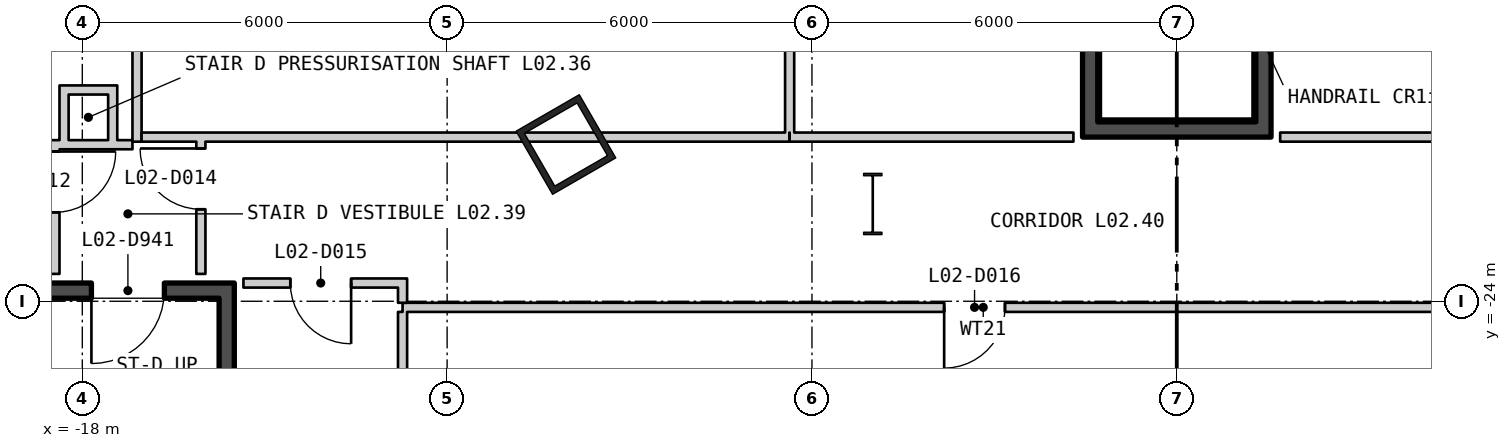
"""IFC4 building model, lengths in metres.
Left out: names, types, materials, properties, quantities, classifications, styles, units other than length and angle.
Written with IfcOpenShell. Run it as: python <this file> out.ifc"""

import sys

from ifc_helpers import new_model, si_unit, direction, frame, frame_2d, origin, origin_2d, place, context, subcontext, project, spatial, rectangle, hollow_rectangle, i_section, extrude, element, fill, save


model = new_model("IFC4")
c1 = context("Model", 3, precision=1e-05, world=origin(), true_north=direction((0.0, 1.0)))
c2 = subcontext(c1, "Body", "Model", "MODEL_VIEW")
j1 = project(units=[si_unit("LENGTHUNIT", "METRE"), si_unit("PLANEANGLEUNIT", "RADIAN")], contexts=[c1])
p1 = place(None, origin())
s1 = spatial("IfcSite", under=j1, at=p1, CompositionType="ELEMENT")
p2 = place(p1, origin())
s2 = spatial("IfcBuilding", under=s1, at=p2, CompositionType="ELEMENT")
p3 = place(p2, frame((0.0, 0.0, 13.5)))
s3 = spatial("IfcBuildingStorey", under=s2, at=p3, CompositionType="ELEMENT", Elevation=13.5)
p4 = place(p3, frame((-10.046, -21.422, 0.0), z_axis=(0.0, 0.0, 1.0), x_axis=(0.5, -0.866025403784, 0.0)))
e1 = element("IfcColumn", 1, at=p4, inside=s3, PredefinedType="COLUMN", context=c2, shape_type="SweptSolid", body=[
    extrude(hollow_rectangle(XDim=1.2, YDim=1.2, WallThickness=0.1, at=origin_2d()), origin(), (0.0, 0.0, 1.0), 5.1),
])
p5 = place(p3, frame((-5.0, -22.4, 0.0), z_axis=(0.0, 0.0, 1.0), x_axis=(1.0, 0.0, 0.0)))
e2 = element("IfcColumn", 2, at=p5, inside=s3, PredefinedType="COLUMN", context=c2, shape_type="SweptSolid", body=[
    extrude(i_section(OverallWidth=0.302, OverallDepth=1.008, WebThickness=0.021, FlangeThickness=0.04, at=origin_2d()), origin(), (0.0, 0.0, 1.0), 5.1),
])
p6 = place(p3, frame((-1.425, -21.05, 0.0), z_axis=(0.0, 0.0, 1.0), x_axis=(0.0, 1.0, 0.0)))
e3 = element("IfcWall", 3, at=p6, inside=s3, PredefinedType="SHEAR", context=c2, shape_type="SweptSolid", body=[
    extrude(rectangle(XDim=7.2, YDim=0.25, at=frame_2d((3.6, 0.0))), origin(), (0.0, 0.0, 1.0), 4.88),
])
p7 = place(p3, frame((1.425, -21.05, 0.0), z_axis=(0.0, 0.0, 1.0), x_axis=(0.0, 1.0, 0.0)))
e4 = element("IfcWall", 4, at=p7, inside=s3, PredefinedType="SHEAR", context=c2, shape_type="SweptSolid", body=[
    extrude(rectangle(XDim=7.2, YDim=0.25, at=frame_2d((3.6, 0.0))), origin(), (0.0, 0.0, 1.0), 4.88),
])
p8 = place(p7, frame((5.89, 0.0, 0.0)))
e5 = element("IfcOpeningElement", 5, at=p8, cuts=e4, PredefinedType="OPENING", context=c2, shape_type="SweptSolid", body=[
    extrude(rectangle(XDim=1.0, YDim=2.1, at=frame_2d((0.5, 1.05))), frame((0.0, 0.135, 0.0), z_axis=(0.0, -1.0, 0.0), x_axis=(1.0, 0.0, 0.0)), (0.0, 0.0, 1.0), 0.27),
])
p9 = place(p3, frame((-1.55, -21.175, 0.0), z_axis=(0.0, 0.0, 1.0), x_axis=(1.0, 0.0, 0.0)))
e6 = element("IfcWall", 6, at=p9, inside=s3, PredefinedType="SHEAR", context=c2, shape_type="SweptSolid", body=[
    extrude(rectangle(XDim=3.1, YDim=0.25, at=frame_2d((1.55, 0.0))), origin(), (0.0, 0.0, 1.0), 4.88),
])
p10 = place(p3, frame((-15.625, -31.25, 0.0), z_axis=(0.0, 0.0, 1.0), x_axis=(0.0, 1.0, 0.0)))
e7 = element("IfcWall", 7, at=p10, inside=s3, PredefinedType="SHEAR", context=c2, shape_type="SweptSolid", body=[
    extrude(rectangle(XDim=7.3, YDim=0.25, at=frame_2d((3.65, 0.0))), origin(), (0.0, 0.0, 1.0), 4.88),
])
p11 = place(p3, frame((-19.0, -23.825, 0.0), z_axis=(0.0, 0.0, 1.0), x_axis=(1.0, 0.0, 0.0)))
e8 = element("IfcWall", 8, at=p11, inside=s3, PredefinedType="SHEAR", context=c2, shape_type="SweptSolid", body=[
    extrude(rectangle(XDim=3.5, YDim=0.25, at=frame_2d((1.75, 0.0))), origin(), (0.0, 0.0, 1.0), 4.88),
])
p12 = place(p11, frame((1.15, 0.0, 0.0)))
e9 = element("IfcOpeningElement", 9, at=p12, cuts=e8, PredefinedType="OPENING", context=c2, shape_type="SweptSolid", body=[
    extrude(rectangle(XDim=1.2, YDim=2.1, at=frame_2d((0.6, 1.05))), frame((0.0, 0.135, 0.0), z_axis=(0.0, -1.0, 0.0), x_axis=(1.0, 0.0, 0.0)), (0.0, 0.0, 1.0), 0.27),
])
p13 = place(p3, frame((-18.45, -23.55, 0.0), z_axis=(0.0, 0.0, 1.0), x_axis=(0.0, 1.0, 0.0)))
e10 = element("IfcWall", 10, at=p13, inside=s3, PredefinedType="PARTITIONING", context=c2, shape_type="SweptSolid", body=[
    extrude(rectangle(XDim=2.2, YDim=0.15, at=frame_2d((1.1, 0.0))), origin(), (0.0, 0.0, 1.0), 4.88),
])
p14 = place(p13, frame((1.013, 0.0, 0.0)))
e11 = element("IfcOpeningElement", 11, at=p14, cuts=e10, PredefinedType="OPENING", context=c2, shape_type="SweptSolid", body=[
    extrude(rectangle(XDim=1.0, YDim=2.1, at=frame_2d((0.5, 1.05))), frame((0.0, 0.085, 0.0), z_axis=(0.0, -1.0, 0.0), x_axis=(1.0, 0.0, 0.0)), (0.0, 0.0, 1.0), 0.17),
])
p15 = place(p3, frame((-18.3, -21.5, 0.0), z_axis=(0.0, 0.0, 1.0), x_axis=(0.0, 1.0, 0.0)))
e12 = element("IfcWall", 12, at=p15, inside=s3, PredefinedType="PARTITIONING", context=c2, shape_type="SweptSolid", body=[
    extrude(rectangle(XDim=1.05, YDim=0.15, at=frame_2d((0.525, 0.0))), origin(), (0.0, 0.0, 1.0), 4.88),
])
for number, where, z_axis, x_axis in (
    (13, (-18.225, -21.425, 0.0), (0.0, 0.0, 1.0), (1.0, 0.0, 0.0)),
    (14, (-18.225, -20.525, 0.0), (0.0, 0.0, 1.0), (1.0, 0.0, 0.0)),
):
    element("IfcWall", number, at=place(p3, frame(where, z_axis=z_axis, x_axis=x_axis)), inside=s3, PredefinedType="PARTITIONING", context=c2, shape_type="SweptSolid", body=[
        extrude(rectangle(XDim=0.65, YDim=0.15, at=frame_2d((0.325, 0.0))), origin(), (0.0, 0.0, 1.0), 4.88),
    ])
p16 = place(p3, frame((-17.5, -21.5, 0.0), z_axis=(0.0, 0.0, 1.0), x_axis=(0.0, 1.0, 0.0)))
e15 = element("IfcWall", 15, at=p16, inside=s3, PredefinedType="PARTITIONING", context=c2, shape_type="SweptSolid", body=[
    extrude(rectangle(XDim=1.05, YDim=0.15, at=frame_2d((0.525, 0.0))), origin(), (0.0, 0.0, 1.0), 4.88),
])
p17 = place(p3, frame((-17.425, -21.425, 0.0), z_axis=(0.0, 0.0, 1.0), x_axis=(1.0, 0.0, 0.0)))
e16 = element("IfcWall", 16, at=p17, inside=s3, PredefinedType="PARTITIONING", context=c2, shape_type="SweptSolid", body=[
    extrude(rectangle(XDim=0.25, YDim=0.15, at=frame_2d((0.125, 0.0))), origin(), (0.0, 0.0, 1.0), 4.88),
])
p18 = place(p3, frame((-17.1, -21.375, 0.0), z_axis=(0.0, 0.0, 1.0), x_axis=(0.0, 1.0, 0.0)))
e17 = element("IfcWall", 17, at=p18, inside=s3, PredefinedType="PARTITIONING", context=c2, shape_type="SweptSolid", body=[
    extrude(rectangle(XDim=19.05, YDim=0.15, at=frame_2d((9.525, 0.0))), origin(), (0.0, 0.0, 1.0), 4.88),
])
p19 = place(p3, frame((-17.025, -21.3, 0.0), z_axis=(0.0, 0.0, 1.0), x_axis=(1.0, 0.0, 0.0)))
e18 = element("IfcWall", 18, at=p19, inside=s3, PredefinedType="PARTITIONING", context=c2, shape_type="SweptSolid", body=[
    extrude(rectangle(XDim=10.654, YDim=0.15, at=frame_2d((5.327, 0.0))), origin(), (0.0, 0.0, 1.0), 4.88),
])
p20 = place(p3, frame((-16.05, -23.55, 0.0), z_axis=(0.0, 0.0, 1.0), x_axis=(0.0, 1.0, 0.0)))
e19 = element("IfcWall", 19, at=p20, inside=s3, PredefinedType="PARTITIONING", context=c2, shape_type="SweptSolid", body=[
    extrude(rectangle(XDim=2.175, YDim=0.15, at=frame_2d((1.087, 0.0))), origin(), (0.0, 0.0, 1.0), 4.88),
])
p21 = place(p20, frame((1.063, 0.0, 0.0)))
e20 = element("IfcOpeningElement", 20, at=p21, cuts=e19, PredefinedType="OPENING", context=c2, shape_type="SweptSolid", body=[
    extrude(rectangle(XDim=1.0, YDim=2.1, at=frame_2d((0.5, 1.05))), frame((0.0, 0.085, 0.0), z_axis=(0.0, -1.0, 0.0), x_axis=(1.0, 0.0, 0.0)), (0.0, 0.0, 1.0), 0.17),
])
p22 = place(p3, frame((-15.35, -23.7, 0.0), z_axis=(0.0, 0.0, 1.0), x_axis=(1.0, 0.0, 0.0)))
e21 = element("IfcWall", 21, at=p22, inside=s3, PredefinedType="PARTITIONING", context=c2, shape_type="SweptSolid", body=[
    extrude(rectangle(XDim=2.542, YDim=0.15, at=frame_2d((1.271, 0.0))), origin(), (0.0, 0.0, 1.0), 4.88),
])
p23 = place(p22, frame((0.771, 0.0, 0.0)))
e22 = element("IfcOpeningElement", 22, at=p23, cuts=e21, PredefinedType="OPENING", context=c2, shape_type="SweptSolid", body=[
    extrude(rectangle(XDim=1.0, YDim=2.1, at=frame_2d((0.5, 1.05))), frame((0.0, 0.085, 0.0), z_axis=(0.0, -1.0, 0.0), x_axis=(1.0, 0.0, 0.0)), (0.0, 0.0, 1.0), 0.17),
])
p24 = place(p3, frame((-12.733, -32.9, 0.0), z_axis=(0.0, 0.0, 1.0), x_axis=(0.0, 1.0, 0.0)))
e23 = element("IfcWall", 23, at=p24, inside=s3, PredefinedType="PARTITIONING", context=c2, shape_type="SweptSolid", body=[
    extrude(rectangle(XDim=8.725, YDim=0.15, at=frame_2d((4.362, 0.0))), origin(), (0.0, 0.0, 1.0), 4.19),
])
p25 = place(p3, frame((-12.733, -24.1, 0.0), z_axis=(0.0, 0.0, 1.0), x_axis=(1.0, 0.0, 0.0)))
e24 = element("IfcWall", 24, at=p25, inside=s3, PredefinedType="PARTITIONING", context=c2, shape_type="SweptSolid", body=[
    extrude(rectangle(XDim=19.1, YDim=0.15, at=frame_2d((9.55, 0.0))), origin(), (0.0, 0.0, 1.0), 4.88),
])
p26 = place(p25, frame((8.907, 0.0, 0.0)))
e25 = element("IfcOpeningElement", 25, at=p26, cuts=e24, PredefinedType="OPENING", context=c2, shape_type="SweptSolid", body=[
    extrude(rectangle(XDim=1.0, YDim=2.1, at=frame_2d((0.5, 1.05))), frame((0.0, 0.085, 0.0), z_axis=(0.0, -1.0, 0.0), x_axis=(1.0, 0.0, 0.0)), (0.0, 0.0, 1.0), 0.17),
])
p27 = place(p3, frame((-12.733, -24.025, 0.0), z_axis=(0.0, 0.0, 1.0), x_axis=(0.0, 1.0, 0.0)))
e26 = element("IfcWall", 26, at=p27, inside=s3, PredefinedType="PARTITIONING", context=c2, shape_type="SweptSolid", body=[
    extrude(rectangle(XDim=0.4, YDim=0.15, at=frame_2d((0.2, 0.0))), origin(), (0.0, 0.0, 1.0), 4.88),
])
p28 = place(p3, frame((-6.367, -21.3, 0.0), z_axis=(0.0, 0.0, 1.0), x_axis=(1.0, 0.0, 0.0)))
e27 = element("IfcWall", 27, at=p28, inside=s3, PredefinedType="PARTITIONING", context=c2, shape_type="SweptSolid", body=[
    extrude(rectangle(XDim=4.667, YDim=0.15, at=frame_2d((2.333, 0.0))), origin(), (0.0, 0.0, 1.0), 4.88),
])
p29 = place(p3, frame((-6.367, -21.225, 0.0), z_axis=(0.0, 0.0, 1.0), x_axis=(0.0, 1.0, 0.0)))
e28 = element("IfcWall", 28, at=p29, inside=s3, PredefinedType="PARTITIONING", context=c2, shape_type="SweptSolid", body=[
    extrude(rectangle(XDim=7.621, YDim=0.15, at=frame_2d((3.811, 0.0))), origin(), (0.0, 0.0, 1.0), 4.28),
])
p30 = place(p3, frame((1.7, -21.3, 0.0), z_axis=(0.0, 0.0, 1.0), x_axis=(1.0, 0.0, 0.0)))
e29 = element("IfcWall", 29, at=p30, inside=s3, PredefinedType="PARTITIONING", context=c2, shape_type="SweptSolid", body=[
    extrude(rectangle(XDim=15.725, YDim=0.15, at=frame_2d((7.862, 0.0))), origin(), (0.0, 0.0, 1.0), 4.88),
])
p31 = place(p12, origin())
e30 = element("IfcDoor", 30, at=p31, inside=s3, OperationType="SINGLE_SWING_LEFT", PredefinedType="DOOR", context=c2, shape_type="SweptSolid", body=[
    extrude(rectangle(XDim=1.2, YDim=2.1, at=frame_2d((0.6, 1.05))), frame((0.0, 0.025, 0.0), z_axis=(0.0, -1.0, 0.0), x_axis=(1.0, 0.0, 0.0)), (0.0, 0.0, 1.0), 0.05),
])
fill(e9, e30)
p32 = place(p14, origin())
e31 = element("IfcDoor", 31, at=p32, inside=s3, OperationType="SINGLE_SWING_RIGHT", PredefinedType="DOOR", context=c2, shape_type="SweptSolid", body=[
    extrude(rectangle(XDim=1.0, YDim=2.1, at=frame_2d((0.5, 1.05))), frame((0.0, 0.025, 0.0), z_axis=(0.0, -1.0, 0.0), x_axis=(1.0, 0.0, 0.0)), (0.0, 0.0, 1.0), 0.05),
])
fill(e11, e31)
p33 = place(p21, origin())
e32 = element("IfcDoor", 32, at=p33, inside=s3, OperationType="SINGLE_SWING_LEFT", PredefinedType="DOOR", context=c2, shape_type="SweptSolid", body=[
    extrude(rectangle(XDim=1.0, YDim=2.1, at=frame_2d((0.5, 1.05))), frame((0.0, 0.025, 0.0), z_axis=(0.0, -1.0, 0.0), x_axis=(1.0, 0.0, 0.0)), (0.0, 0.0, 1.0), 0.05),
])
fill(e20, e32)
p34 = place(p23, origin())
e33 = element("IfcDoor", 33, at=p34, inside=s3, OperationType="SINGLE_SWING_RIGHT", PredefinedType="DOOR", context=c2, shape_type="SweptSolid", body=[
    extrude(rectangle(XDim=1.0, YDim=2.1, at=frame_2d((0.5, 1.05))), frame((0.0, 0.025, 0.0), z_axis=(0.0, -1.0, 0.0), x_axis=(1.0, 0.0, 0.0)), (0.0, 0.0, 1.0), 0.05),
])
fill(e22, e33)
p35 = place(p26, origin())
e34 = element("IfcDoor", 34, at=p35, inside=s3, OperationType="SINGLE_SWING_LEFT", PredefinedType="DOOR", context=c2, shape_type="SweptSolid", body=[
    extrude(rectangle(XDim=1.0, YDim=2.1, at=frame_2d((0.5, 1.05))), frame((0.0, 0.025, 0.0), z_axis=(0.0, -1.0, 0.0), x_axis=(1.0, 0.0, 0.0)), (0.0, 0.0, 1.0), 0.05),
])
fill(e25, e34)
save(model, sys.argv[1])
